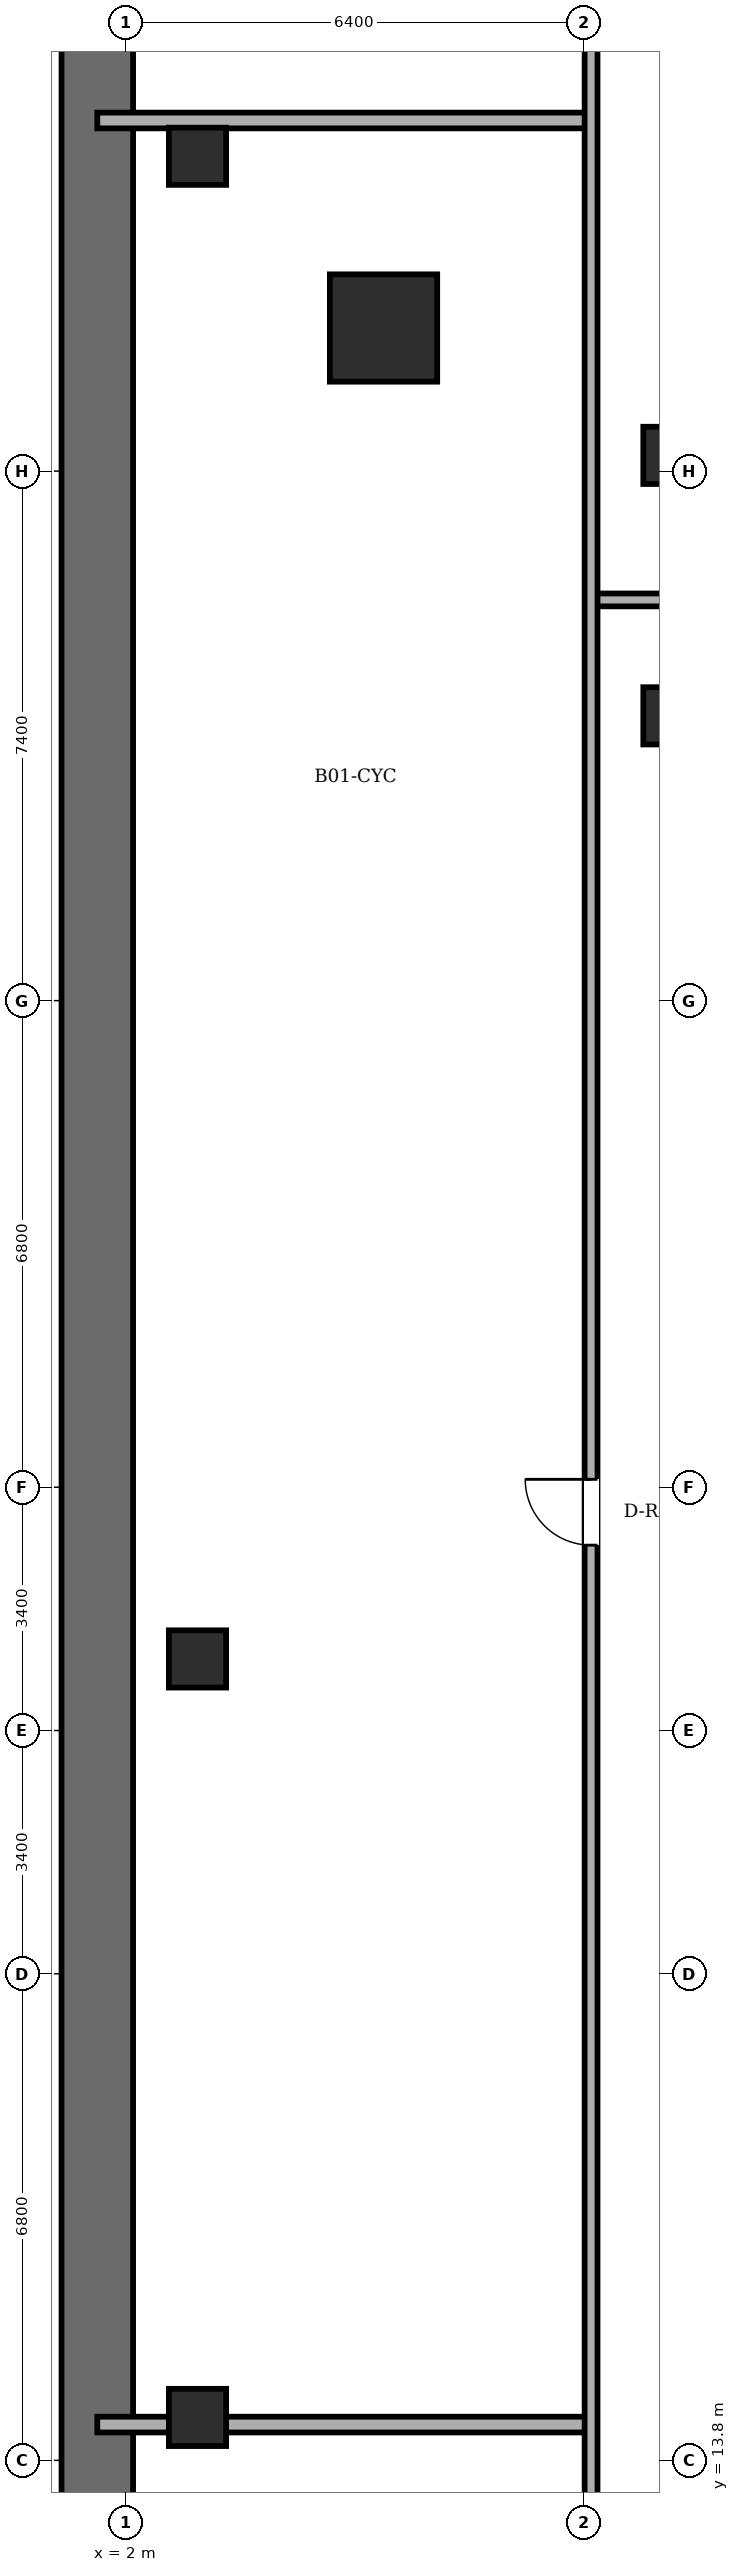
"""IFC4 building model, lengths in metres.
Left out: names, types, materials, properties, quantities, classifications, styles, units other than length and angle.
Written with IfcOpenShell. Run it as: python <this file> out.ifc"""

import sys

from ifc_helpers import new_model, si_unit, direction, frame, frame_2d, origin, origin_2d, place, context, subcontext, project, spatial, rectangle, circle, extrude, element, fill, save


model = new_model("IFC4")
c1 = context("Model", 3, precision=1e-05, world=origin(), true_north=direction((0.0, 1.0)))
c2 = subcontext(c1, "Body", "Model", "MODEL_VIEW")
j1 = project(units=[si_unit("LENGTHUNIT", "METRE"), si_unit("PLANEANGLEUNIT", "RADIAN")], contexts=[c1])
p1 = place(None, origin())
s1 = spatial("IfcSite", under=j1, at=p1, CompositionType="ELEMENT")
p2 = place(p1, origin())
s2 = spatial("IfcBuilding", under=s1, at=p2, CompositionType="ELEMENT")
p3 = place(p2, frame((0.0, 0.0, -4.2)))
s3 = spatial("IfcBuildingStorey", under=s2, at=p3, CompositionType="ELEMENT", Elevation=-4.2)
p4 = place(p3, frame((5.6, 43.6, 0.0), z_axis=(0.0, 0.0, 1.0), x_axis=(1.0, 0.0, 0.0)))
e1 = element("IfcColumn", 1, at=p4, inside=s3, PredefinedType="COLUMN", context=c2, shape_type="SweptSolid", body=[
    extrude(circle(Radius=0.75, at=origin_2d()), origin(), (0.0, 0.0, 1.0), 4.2),
])
for number, where, z_axis, x_axis in (
    (2, (3.0, 46.0, 0.0), (0.0, 0.0, 1.0), (1.0, 0.0, 0.0)),
    (3, (3.0, 14.4, 0.0), (0.0, 0.0, 1.0), (1.0, 0.0, 0.0)),
    (4, (3.0, 25.0, 0.0), (0.0, 0.0, 1.0), (1.0, 0.0, 0.0)),
    (5, (9.63, 38.18, 0.0), (0.0, 0.0, 1.0), (1.0, 0.0, 0.0)),
    (6, (9.63, 41.82, 0.0), (0.0, 0.0, 1.0), (1.0, 0.0, 0.0)),
):
    element("IfcColumn", number, at=place(p3, frame(where, z_axis=z_axis, x_axis=x_axis)), inside=s3, PredefinedType="COLUMN", context=c2, shape_type="SweptSolid", body=[
        extrude(rectangle(XDim=0.8, YDim=0.8, at=origin_2d()), origin(), (0.0, 0.0, 1.0), 4.2),
    ])
p5 = place(p3, frame((1.6, 48.0, 0.0), z_axis=(0.0, 0.0, 1.0), x_axis=(0.0, -1.0, 0.0)))
e7 = element("IfcWall", 7, at=p5, inside=s3, PredefinedType="SOLIDWALL", context=c2, shape_type="SweptSolid", body=[
    extrude(rectangle(XDim=48.0, YDim=1.0, at=frame_2d((24.0, 0.0))), origin(), (0.0, 0.0, 1.0), 3.96),
])
p6 = place(p3, frame((1.6, 14.3, 0.0), z_axis=(0.0, 0.0, 1.0), x_axis=(1.0, 0.0, 0.0)))
e8 = element("IfcWall", 8, at=p6, inside=s3, PredefinedType="PARTITIONING", context=c2, shape_type="SweptSolid", body=[
    extrude(rectangle(XDim=6.9, YDim=0.22, at=frame_2d((3.45, 0.0))), origin(), (0.0, 0.0, 1.0), 3.492),
])
p7 = place(p3, frame((8.5, 39.8, 0.0), z_axis=(0.0, 0.0, 1.0), x_axis=(1.0, 0.0, 0.0)))
e9 = element("IfcWall", 9, at=p7, inside=s3, PredefinedType="PARTITIONING", context=c2, shape_type="SweptSolid", body=[
    extrude(rectangle(XDim=49.9, YDim=0.18, at=frame_2d((24.95, 0.0))), origin(), (0.0, 0.0, 1.0), 3.96),
])
p8 = place(p7, frame((18.74, 0.0, 0.0)))
e10 = element("IfcOpeningElement", 10, at=p8, cuts=e9, PredefinedType="OPENING", context=c2, shape_type="SweptSolid", body=[
    extrude(rectangle(XDim=0.92, YDim=2.1, at=frame_2d((0.46, 1.05))), frame((0.0, 0.1, 0.0), z_axis=(0.0, -1.0, 0.0), x_axis=(1.0, 0.0, 0.0)), (0.0, 0.0, 1.0), 0.2),
])
p9 = place(p3, frame((1.6, 46.5, 0.0), z_axis=(0.0, 0.0, 1.0), x_axis=(1.0, 0.0, 0.0)))
e11 = element("IfcWall", 11, at=p9, inside=s3, PredefinedType="PARTITIONING", context=c2, shape_type="SweptSolid", body=[
    extrude(rectangle(XDim=6.9, YDim=0.22, at=frame_2d((3.45, 0.0))), origin(), (0.0, 0.0, 1.0), 3.96),
])
p10 = place(p3, frame((8.5, 8.2, 0.0), z_axis=(0.0, 0.0, 1.0), x_axis=(0.0, 1.0, 0.0)))
e12 = element("IfcWall", 12, at=p10, inside=s3, PredefinedType="PARTITIONING", context=c2, shape_type="SweptSolid", body=[
    extrude(rectangle(XDim=39.8, YDim=0.18, at=frame_2d((19.9, 0.0))), origin(), (0.0, 0.0, 1.0), 3.96),
])
p11 = place(p10, frame((18.39, 0.0, 0.0)))
e13 = element("IfcOpeningElement", 13, at=p11, cuts=e12, PredefinedType="OPENING", context=c2, shape_type="SweptSolid", body=[
    extrude(rectangle(XDim=0.92, YDim=2.1, at=frame_2d((0.46, 1.05))), frame((0.0, 0.1, 0.0), z_axis=(0.0, -1.0, 0.0), x_axis=(1.0, 0.0, 0.0)), (0.0, 0.0, 1.0), 0.2),
])
p12 = place(p11, origin())
e14 = element("IfcDoor", 14, at=p12, inside=s3, OperationType="SINGLE_SWING_RIGHT", PredefinedType="DOOR", context=c2, shape_type="SweptSolid", body=[
    extrude(rectangle(XDim=0.92, YDim=2.1, at=frame_2d((0.46, 1.05))), frame((0.0, 0.025, 0.0), z_axis=(0.0, -1.0, 0.0), x_axis=(1.0, 0.0, 0.0)), (0.0, 0.0, 1.0), 0.05),
])
fill(e13, e14)
save(model, sys.argv[1])
